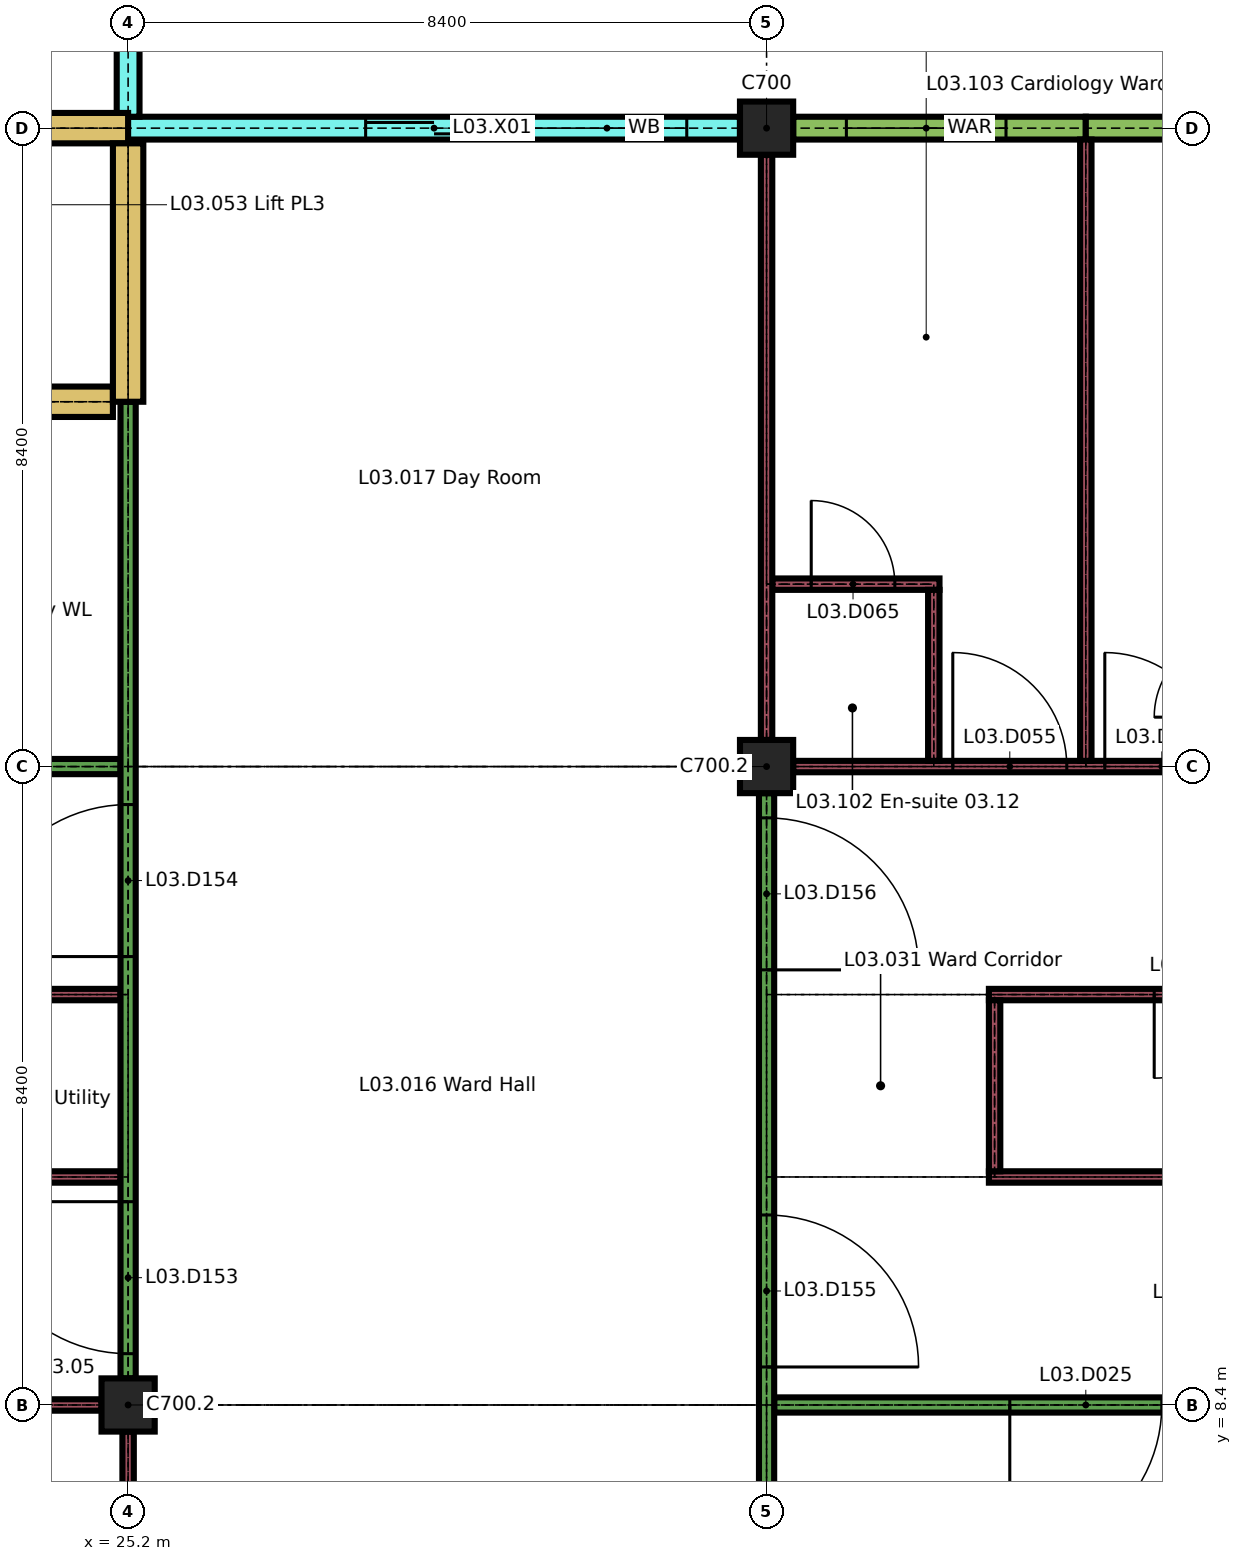
"""IFC4 building model, lengths in metres.
Left out: names, types, materials, properties, quantities, classifications, styles, units other than length and angle.
Written with IfcOpenShell. Run it as: python <this file> out.ifc"""

import sys

from ifc_helpers import new_model, si_unit, direction, frame, frame_2d, origin, origin_2d, place, context, subcontext, project, spatial, rectangle, extrude, element, fill, save


model = new_model("IFC4")
c1 = context("Model", 3, precision=1e-05, world=origin(), true_north=direction((0.0, 1.0)))
c2 = subcontext(c1, "Body", "Model", "MODEL_VIEW")
j1 = project(units=[si_unit("LENGTHUNIT", "METRE"), si_unit("PLANEANGLEUNIT", "RADIAN")], contexts=[c1])
p1 = place(None, origin())
s1 = spatial("IfcSite", under=j1, at=p1, CompositionType="ELEMENT")
p2 = place(p1, origin())
s2 = spatial("IfcBuilding", under=s1, at=p2, CompositionType="ELEMENT")
p3 = place(p2, frame((0.0, 0.0, 15.3)))
s3 = spatial("IfcBuildingStorey", under=s2, at=p3, CompositionType="ELEMENT", Elevation=15.3)
for number, where, z_axis, x_axis in (
    (1, (25.2, 8.4, 0.0), (0.0, 0.0, 1.0), (1.0, 0.0, 0.0)),
    (2, (33.6, 16.8, 0.0), (0.0, 0.0, 1.0), (1.0, 0.0, 0.0)),
    (3, (33.6, 25.2, 0.0), (0.0, 0.0, 1.0), (1.0, 0.0, 0.0)),
):
    element("IfcColumn", number, at=place(p3, frame(where, z_axis=z_axis, x_axis=x_axis)), inside=s3, PredefinedType="COLUMN", context=c2, shape_type="SweptSolid", body=[
        extrude(rectangle(XDim=0.7, YDim=0.7, at=origin_2d()), origin(), (0.0, 0.0, 1.0), 3.26),
    ])
p4 = place(p3, frame((25.05, 25.2, 0.0), z_axis=(0.0, 0.0, 1.0), x_axis=(1.0, 0.0, 0.0)))
e4 = element("IfcWall", 4, at=p4, inside=s3, PredefinedType="SOLIDWALL", context=c2, shape_type="SweptSolid", body=[
    extrude(rectangle(XDim=8.2, YDim=0.3, at=frame_2d((4.1, 0.0))), origin(), (0.0, 0.0, 1.0), 3.26),
])
p5 = place(p4, frame((5.4, 0.0, 0.6)))
e5 = element("IfcOpeningElement", 5, at=p5, cuts=e4, PredefinedType="OPENING", context=c2, shape_type="SweptSolid", body=[
    extrude(rectangle(XDim=2.1, YDim=1.8, at=frame_2d((1.05, 0.9))), frame((0.0, 0.16, 0.0), z_axis=(0.0, -1.0, 0.0), x_axis=(1.0, 0.0, 0.0)), (0.0, 0.0, 1.0), 0.32),
])
p6 = place(p4, frame((3.275, 0.0, 0.0)))
e6 = element("IfcOpeningElement", 6, at=p6, cuts=e4, PredefinedType="OPENING", context=c2, shape_type="SweptSolid", body=[
    extrude(rectangle(XDim=1.8, YDim=2.4, at=frame_2d((0.9, 1.2))), frame((0.0, 0.16, 0.0), z_axis=(0.0, -1.0, 0.0), x_axis=(1.0, 0.0, 0.0)), (0.0, 0.0, 1.0), 0.32),
])
p7 = place(p3, frame((33.95, 25.2, 0.0), z_axis=(0.0, 0.0, 1.0), x_axis=(1.0, 0.0, 0.0)))
e7 = element("IfcWall", 7, at=p7, inside=s3, PredefinedType="SOLIDWALL", context=c2, shape_type="SweptSolid", body=[
    extrude(rectangle(XDim=3.85, YDim=0.3, at=frame_2d((1.925, 0.0))), origin(), (0.0, 0.0, 1.0), 2.96),
])
p8 = place(p7, frame((0.7, 0.0, 0.9)))
e8 = element("IfcOpeningElement", 8, at=p8, cuts=e7, PredefinedType="OPENING", context=c2, shape_type="SweptSolid", body=[
    extrude(rectangle(XDim=2.1, YDim=1.5, at=frame_2d((1.05, 0.75))), frame((0.0, 0.16, 0.0), z_axis=(0.0, -1.0, 0.0), x_axis=(1.0, 0.0, 0.0)), (0.0, 0.0, 1.0), 0.32),
])
p9 = place(p3, frame((37.8, 25.2, 0.0), z_axis=(0.0, 0.0, 1.0), x_axis=(1.0, 0.0, 0.0)))
e9 = element("IfcWall", 9, at=p9, inside=s3, PredefinedType="SOLIDWALL", context=c2, shape_type="SweptSolid", body=[
    extrude(rectangle(XDim=3.825, YDim=0.3, at=frame_2d((1.913, 0.0))), origin(), (0.0, 0.0, 1.0), 2.96),
])
p10 = place(p9, frame((1.05, 0.0, 0.9)))
e10 = element("IfcOpeningElement", 10, at=p10, cuts=e9, PredefinedType="OPENING", context=c2, shape_type="SweptSolid", body=[
    extrude(rectangle(XDim=2.1, YDim=1.5, at=frame_2d((1.05, 0.75))), frame((0.0, 0.16, 0.0), z_axis=(0.0, -1.0, 0.0), x_axis=(1.0, 0.0, 0.0)), (0.0, 0.0, 1.0), 0.32),
])
p11 = place(p3, frame((25.2, 25.35, 0.0), z_axis=(0.0, 0.0, 1.0), x_axis=(0.0, 1.0, 0.0)))
e11 = element("IfcWall", 11, at=p11, inside=s3, PredefinedType="SOLIDWALL", context=c2, shape_type="SweptSolid", body=[
    extrude(rectangle(XDim=7.9, YDim=0.3, at=frame_2d((3.95, 0.0))), origin(), (0.0, 0.0, 1.0), 3.26),
])
p12 = place(p11, frame((5.25, 0.0, 0.6)))
e12 = element("IfcOpeningElement", 12, at=p12, cuts=e11, PredefinedType="OPENING", context=c2, shape_type="SweptSolid", body=[
    extrude(rectangle(XDim=1.8, YDim=1.8, at=frame_2d((0.9, 0.9))), frame((0.0, 0.16, 0.0), z_axis=(0.0, -1.0, 0.0), x_axis=(1.0, 0.0, 0.0)), (0.0, 0.0, 1.0), 0.32),
])
p13 = place(p11, frame((3.075, 0.0, 0.0)))
e13 = element("IfcOpeningElement", 13, at=p13, cuts=e11, PredefinedType="OPENING", context=c2, shape_type="SweptSolid", body=[
    extrude(rectangle(XDim=1.8, YDim=2.4, at=frame_2d((0.9, 1.2))), frame((0.0, 0.16, 0.0), z_axis=(0.0, -1.0, 0.0), x_axis=(1.0, 0.0, 0.0)), (0.0, 0.0, 1.0), 0.32),
])
p14 = place(p3, frame((20.925, 8.4, 0.0), z_axis=(0.0, 0.0, 1.0), x_axis=(1.0, 0.0, 0.0)))
e14 = element("IfcWall", 14, at=p14, inside=s3, PredefinedType="PARTITIONING", context=c2, shape_type="SweptSolid", body=[
    extrude(rectangle(XDim=3.925, YDim=0.15, at=frame_2d((1.962, 0.0))), origin(), (0.0, 0.0, 1.0), 3.26),
])
p15 = place(p14, frame((0.325, 0.0, 0.0)))
e15 = element("IfcOpeningElement", 15, at=p15, cuts=e14, PredefinedType="OPENING", context=c2, shape_type="SweptSolid", body=[
    extrude(rectangle(XDim=1.5, YDim=2.4, at=frame_2d((0.75, 1.2))), frame((0.0, 0.085, 0.0), z_axis=(0.0, -1.0, 0.0), x_axis=(1.0, 0.0, 0.0)), (0.0, 0.0, 1.0), 0.17),
])
p16 = place(p3, frame((33.7, 8.4, 0.0), z_axis=(0.0, 0.0, 1.0), x_axis=(1.0, 0.0, 0.0)))
e16 = element("IfcWall", 16, at=p16, inside=s3, PredefinedType="PARTITIONING", context=c2, shape_type="SweptSolid", body=[
    extrude(rectangle(XDim=8.2, YDim=0.2, at=frame_2d((4.1, 0.0))), origin(), (0.0, 0.0, 1.0), 3.26),
])
p17 = place(p16, frame((3.1, 0.0, 0.0)))
e17 = element("IfcOpeningElement", 17, at=p17, cuts=e16, PredefinedType="OPENING", context=c2, shape_type="SweptSolid", body=[
    extrude(rectangle(XDim=2.0, YDim=2.4, at=frame_2d((1.0, 1.2))), frame((0.0, 0.11, 0.0), z_axis=(0.0, -1.0, 0.0), x_axis=(1.0, 0.0, 0.0)), (0.0, 0.0, 1.0), 0.22),
])
for number, where, z_axis, x_axis in (
    (18, (19.725, 11.4, 0.0), (0.0, 0.0, 1.0), (1.0, 0.0, 0.0)),
    (19, (36.525, 11.4, 0.0), (0.0, 0.0, 1.0), (1.0, 0.0, 0.0)),
):
    element("IfcWall", number, at=place(p3, frame(where, z_axis=z_axis, x_axis=x_axis)), inside=s3, PredefinedType="PARTITIONING", context=c2, shape_type="SweptSolid", body=[
        extrude(rectangle(XDim=5.375, YDim=0.15, at=frame_2d((2.688, 0.0))), origin(), (0.0, 0.0, 1.0), 3.26),
    ])
p18 = place(p3, frame((11.325, 13.8, 0.0), z_axis=(0.0, 0.0, 1.0), x_axis=(1.0, 0.0, 0.0)))
e20 = element("IfcWall", 20, at=p18, inside=s3, PredefinedType="PARTITIONING", context=c2, shape_type="SweptSolid", body=[
    extrude(rectangle(XDim=13.775, YDim=0.15, at=frame_2d((6.888, 0.0))), origin(), (0.0, 0.0, 1.0), 3.26),
])
p19 = place(p18, frame((10.525, 0.0, 0.0)))
e21 = element("IfcOpeningElement", 21, at=p19, cuts=e20, PredefinedType="OPENING", context=c2, shape_type="SweptSolid", body=[
    extrude(rectangle(XDim=1.2, YDim=2.1, at=frame_2d((0.6, 1.05))), frame((0.0, 0.085, 0.0), z_axis=(0.0, -1.0, 0.0), x_axis=(1.0, 0.0, 0.0)), (0.0, 0.0, 1.0), 0.17),
])
p20 = place(p3, frame((36.525, 13.8, 0.0), z_axis=(0.0, 0.0, 1.0), x_axis=(1.0, 0.0, 0.0)))
e22 = element("IfcWall", 22, at=p20, inside=s3, PredefinedType="PARTITIONING", context=c2, shape_type="SweptSolid", body=[
    extrude(rectangle(XDim=5.375, YDim=0.15, at=frame_2d((2.688, 0.0))), origin(), (0.0, 0.0, 1.0), 3.26),
])
p21 = place(p20, frame((2.175, 0.0, 0.0)))
e23 = element("IfcOpeningElement", 23, at=p21, cuts=e22, PredefinedType="OPENING", context=c2, shape_type="SweptSolid", body=[
    extrude(rectangle(XDim=1.1, YDim=2.1, at=frame_2d((0.55, 1.05))), frame((0.0, 0.085, 0.0), z_axis=(0.0, -1.0, 0.0), x_axis=(1.0, 0.0, 0.0)), (0.0, 0.0, 1.0), 0.17),
])
p22 = place(p3, frame((16.7, 16.8, 0.0), z_axis=(0.0, 0.0, 1.0), x_axis=(1.0, 0.0, 0.0)))
e24 = element("IfcWall", 24, at=p22, inside=s3, PredefinedType="PARTITIONING", context=c2, shape_type="SweptSolid", body=[
    extrude(rectangle(XDim=8.4, YDim=0.2, at=frame_2d((4.2, 0.0))), origin(), (0.0, 0.0, 1.0), 3.26),
])
p23 = place(p22, frame((3.25, 0.0, 0.0)))
e25 = element("IfcOpeningElement", 25, at=p23, cuts=e24, PredefinedType="OPENING", context=c2, shape_type="SweptSolid", body=[
    extrude(rectangle(XDim=2.0, YDim=2.4, at=frame_2d((1.0, 1.2))), frame((0.0, 0.11, 0.0), z_axis=(0.0, -1.0, 0.0), x_axis=(1.0, 0.0, 0.0)), (0.0, 0.0, 1.0), 0.22),
])
p24 = place(p3, frame((33.95, 16.8, 0.0), z_axis=(0.0, 0.0, 1.0), x_axis=(1.0, 0.0, 0.0)))
e26 = element("IfcWall", 26, at=p24, inside=s3, PredefinedType="PARTITIONING", context=c2, shape_type="SweptSolid", body=[
    extrude(rectangle(XDim=7.675, YDim=0.15, at=frame_2d((3.837, 0.0))), origin(), (0.0, 0.0, 1.0), 3.26),
])
p25 = place(p24, frame((2.1, 0.0, 0.0)))
e27 = element("IfcOpeningElement", 27, at=p25, cuts=e26, PredefinedType="OPENING", context=c2, shape_type="SweptSolid", body=[
    extrude(rectangle(XDim=1.5, YDim=2.4, at=frame_2d((0.75, 1.2))), frame((0.0, 0.085, 0.0), z_axis=(0.0, -1.0, 0.0), x_axis=(1.0, 0.0, 0.0)), (0.0, 0.0, 1.0), 0.17),
])
p26 = place(p24, frame((4.1, 0.0, 0.0)))
e28 = element("IfcOpeningElement", 28, at=p26, cuts=e26, PredefinedType="OPENING", context=c2, shape_type="SweptSolid", body=[
    extrude(rectangle(XDim=1.5, YDim=2.4, at=frame_2d((0.75, 1.2))), frame((0.0, 0.085, 0.0), z_axis=(0.0, -1.0, 0.0), x_axis=(1.0, 0.0, 0.0)), (0.0, 0.0, 1.0), 0.17),
])
p27 = place(p3, frame((33.675, 19.2, 0.0), z_axis=(0.0, 0.0, 1.0), x_axis=(1.0, 0.0, 0.0)))
e29 = element("IfcWall", 29, at=p27, inside=s3, PredefinedType="PARTITIONING", context=c2, shape_type="SweptSolid", body=[
    extrude(rectangle(XDim=2.2, YDim=0.15, at=frame_2d((1.1, 0.0))), origin(), (0.0, 0.0, 1.0), 3.26),
])
p28 = place(p27, frame((0.512, 0.0, 0.0)))
e30 = element("IfcOpeningElement", 30, at=p28, cuts=e29, PredefinedType="OPENING", context=c2, shape_type="SweptSolid", body=[
    extrude(rectangle(XDim=1.1, YDim=2.1, at=frame_2d((0.55, 1.05))), frame((0.0, 0.085, 0.0), z_axis=(0.0, -1.0, 0.0), x_axis=(1.0, 0.0, 0.0)), (0.0, 0.0, 1.0), 0.17),
])
p29 = place(p3, frame((17.0, 21.6, 0.0), z_axis=(0.0, 0.0, 1.0), x_axis=(1.0, 0.0, 0.0)))
e31 = element("IfcWall", 31, at=p29, inside=s3, PredefinedType="SHEAR", context=c2, shape_type="SweptSolid", body=[
    extrude(rectangle(XDim=8.0, YDim=0.4, at=frame_2d((4.0, 0.0))), origin(), (0.0, 0.0, 1.0), 3.26),
])
p30 = place(p29, frame((1.35, 0.0, 0.0)))
e32 = element("IfcOpeningElement", 32, at=p30, cuts=e31, PredefinedType="OPENING", context=c2, shape_type="SweptSolid", body=[
    extrude(rectangle(XDim=1.3, YDim=2.1, at=frame_2d((0.65, 1.05))), frame((0.0, 0.21, 0.0), z_axis=(0.0, -1.0, 0.0), x_axis=(1.0, 0.0, 0.0)), (0.0, 0.0, 1.0), 0.42),
])
p31 = place(p29, frame((5.45, 0.0, 0.0)))
e33 = element("IfcOpeningElement", 33, at=p31, cuts=e31, PredefinedType="OPENING", context=c2, shape_type="SweptSolid", body=[
    extrude(rectangle(XDim=1.1, YDim=2.1, at=frame_2d((0.55, 1.05))), frame((0.0, 0.21, 0.0), z_axis=(0.0, -1.0, 0.0), x_axis=(1.0, 0.0, 0.0)), (0.0, 0.0, 1.0), 0.42),
])
p32 = place(p3, frame((16.8, 25.2, 0.0), z_axis=(0.0, 0.0, 1.0), x_axis=(1.0, 0.0, 0.0)))
e34 = element("IfcWall", 34, at=p32, inside=s3, PredefinedType="SHEAR", context=c2, shape_type="SweptSolid", body=[
    extrude(rectangle(XDim=8.4, YDim=0.4, at=frame_2d((4.2, 0.0))), origin(), (0.0, 0.0, 1.0), 3.26),
])
p33 = place(p3, frame((25.2, 0.35, 0.0), z_axis=(0.0, 0.0, 1.0), x_axis=(0.0, 1.0, 0.0)))
e35 = element("IfcWall", 35, at=p33, inside=s3, PredefinedType="PARTITIONING", context=c2, shape_type="SweptSolid", body=[
    extrude(rectangle(XDim=7.7, YDim=0.15, at=frame_2d((3.85, 0.0))), origin(), (0.0, 0.0, 1.0), 3.26),
])
p34 = place(p3, frame((25.2, 8.75, 0.0), z_axis=(0.0, 0.0, 1.0), x_axis=(0.0, 1.0, 0.0)))
e36 = element("IfcWall", 36, at=p34, inside=s3, PredefinedType="PARTITIONING", context=c2, shape_type="SweptSolid", body=[
    extrude(rectangle(XDim=12.85, YDim=0.2, at=frame_2d((6.425, 0.0))), origin(), (0.0, 0.0, 1.0), 3.26),
])
p35 = place(p34, frame((0.325, 0.0, 0.0)))
e37 = element("IfcOpeningElement", 37, at=p35, cuts=e36, PredefinedType="OPENING", context=c2, shape_type="SweptSolid", body=[
    extrude(rectangle(XDim=2.0, YDim=2.4, at=frame_2d((1.0, 1.2))), frame((0.0, 0.11, 0.0), z_axis=(0.0, -1.0, 0.0), x_axis=(1.0, 0.0, 0.0)), (0.0, 0.0, 1.0), 0.22),
])
p36 = place(p34, frame((5.55, 0.0, 0.0)))
e38 = element("IfcOpeningElement", 38, at=p36, cuts=e36, PredefinedType="OPENING", context=c2, shape_type="SweptSolid", body=[
    extrude(rectangle(XDim=2.0, YDim=2.4, at=frame_2d((1.0, 1.2))), frame((0.0, 0.11, 0.0), z_axis=(0.0, -1.0, 0.0), x_axis=(1.0, 0.0, 0.0)), (0.0, 0.0, 1.0), 0.22),
])
p37 = place(p3, frame((25.2, 21.6, 0.0), z_axis=(0.0, 0.0, 1.0), x_axis=(0.0, 1.0, 0.0)))
e39 = element("IfcWall", 39, at=p37, inside=s3, PredefinedType="SHEAR", context=c2, shape_type="SweptSolid", body=[
    extrude(rectangle(XDim=3.4, YDim=0.4, at=frame_2d((1.7, 0.0))), origin(), (0.0, 0.0, 1.0), 3.26),
])
p38 = place(p3, frame((33.6, 3.6, 0.0), z_axis=(0.0, 0.0, 1.0), x_axis=(0.0, 1.0, 0.0)))
e40 = element("IfcWall", 40, at=p38, inside=s3, PredefinedType="PARTITIONING", context=c2, shape_type="SweptSolid", body=[
    extrude(rectangle(XDim=12.85, YDim=0.2, at=frame_2d((6.425, 0.0))), origin(), (0.0, 0.0, 1.0), 3.26),
])
p39 = place(p38, frame((5.3, 0.0, 0.0)))
e41 = element("IfcOpeningElement", 41, at=p39, cuts=e40, PredefinedType="OPENING", context=c2, shape_type="SweptSolid", body=[
    extrude(rectangle(XDim=2.0, YDim=2.4, at=frame_2d((1.0, 1.2))), frame((0.0, 0.11, 0.0), z_axis=(0.0, -1.0, 0.0), x_axis=(1.0, 0.0, 0.0)), (0.0, 0.0, 1.0), 0.22),
])
p40 = place(p38, frame((10.525, 0.0, 0.0)))
e42 = element("IfcOpeningElement", 42, at=p40, cuts=e40, PredefinedType="OPENING", context=c2, shape_type="SweptSolid", body=[
    extrude(rectangle(XDim=2.0, YDim=2.4, at=frame_2d((1.0, 1.2))), frame((0.0, 0.11, 0.0), z_axis=(0.0, -1.0, 0.0), x_axis=(1.0, 0.0, 0.0)), (0.0, 0.0, 1.0), 0.22),
])
p41 = place(p3, frame((33.6, 17.15, 0.0), z_axis=(0.0, 0.0, 1.0), x_axis=(0.0, 1.0, 0.0)))
e43 = element("IfcWall", 43, at=p41, inside=s3, PredefinedType="PARTITIONING", context=c2, shape_type="SweptSolid", body=[
    extrude(rectangle(XDim=7.7, YDim=0.15, at=frame_2d((3.85, 0.0))), origin(), (0.0, 0.0, 1.0), 3.26),
])
for number, where, z_axis, x_axis in (
    (44, (35.8, 16.875, 0.0), (0.0, 0.0, 1.0), (0.0, 1.0, 0.0)),
    (45, (36.6, 11.475, 0.0), (0.0, 0.0, 1.0), (0.0, 1.0, 0.0)),
):
    element("IfcWall", number, at=place(p3, frame(where, z_axis=z_axis, x_axis=x_axis)), inside=s3, PredefinedType="PARTITIONING", context=c2, shape_type="SweptSolid", body=[
        extrude(rectangle(XDim=2.25, YDim=0.15, at=frame_2d((1.125, 0.0))), origin(), (0.0, 0.0, 1.0), 3.26),
    ])
p42 = place(p3, frame((37.8, 16.875, 0.0), z_axis=(0.0, 0.0, 1.0), x_axis=(0.0, 1.0, 0.0)))
e46 = element("IfcWall", 46, at=p42, inside=s3, PredefinedType="PARTITIONING", context=c2, shape_type="SweptSolid", body=[
    extrude(rectangle(XDim=8.175, YDim=0.15, at=frame_2d((4.087, 0.0))), origin(), (0.0, 0.0, 1.0), 3.26),
])
p43 = place(p5, origin())
e47 = element("IfcWindow", 47, at=p43, inside=s3, PartitioningType="DOUBLE_PANEL_VERTICAL", PredefinedType="WINDOW", context=c2, shape_type="SweptSolid", body=[
    extrude(rectangle(XDim=2.1, YDim=1.8, at=frame_2d((1.05, 0.9))), frame((0.0, 0.03, 0.0), z_axis=(0.0, -1.0, 0.0), x_axis=(1.0, 0.0, 0.0)), (0.0, 0.0, 1.0), 0.06),
])
fill(e5, e47)
p44 = place(p6, origin())
e48 = element("IfcDoor", 48, at=p44, inside=s3, OperationType="DOUBLE_DOOR_SLIDING", PredefinedType="DOOR", context=c2, shape_type="SweptSolid", body=[
    extrude(rectangle(XDim=1.8, YDim=2.4, at=frame_2d((0.9, 1.2))), frame((0.0, 0.03, 0.0), z_axis=(0.0, -1.0, 0.0), x_axis=(1.0, 0.0, 0.0)), (0.0, 0.0, 1.0), 0.06),
])
fill(e6, e48)
p45 = place(p8, origin())
e49 = element("IfcWindow", 49, at=p45, inside=s3, PartitioningType="DOUBLE_PANEL_VERTICAL", PredefinedType="WINDOW", context=c2, shape_type="SweptSolid", body=[
    extrude(rectangle(XDim=2.1, YDim=1.5, at=frame_2d((1.05, 0.75))), frame((0.0, 0.05, 0.0), z_axis=(0.0, -1.0, 0.0), x_axis=(1.0, 0.0, 0.0)), (0.0, 0.0, 1.0), 0.1),
])
fill(e8, e49)
p46 = place(p17, origin())
e50 = element("IfcDoor", 50, at=p46, inside=s3, OperationType="SINGLE_SWING_LEFT", PredefinedType="DOOR", context=c2, shape_type="SweptSolid", body=[
    extrude(rectangle(XDim=2.0, YDim=2.4, at=frame_2d((1.0, 1.2))), frame((0.0, 0.03, 0.0), z_axis=(0.0, -1.0, 0.0), x_axis=(1.0, 0.0, 0.0)), (0.0, 0.0, 1.0), 0.06),
])
fill(e17, e50)
p47 = place(p21, origin())
e51 = element("IfcDoor", 51, at=p47, inside=s3, OperationType="SINGLE_SWING_LEFT", PredefinedType="DOOR", context=c2, shape_type="SweptSolid", body=[
    extrude(rectangle(XDim=1.1, YDim=2.1, at=frame_2d((0.55, 1.05))), frame((0.0, 0.025, 0.0), z_axis=(0.0, -1.0, 0.0), x_axis=(1.0, 0.0, 0.0)), (0.0, 0.0, 1.0), 0.05),
])
fill(e23, e51)
p48 = place(p25, origin())
e52 = element("IfcDoor", 52, at=p48, inside=s3, OperationType="SINGLE_SWING_RIGHT", PredefinedType="DOOR", context=c2, shape_type="SweptSolid", body=[
    extrude(rectangle(XDim=1.5, YDim=2.4, at=frame_2d((0.75, 1.2))), frame((0.0, 0.03, 0.0), z_axis=(0.0, -1.0, 0.0), x_axis=(1.0, 0.0, 0.0)), (0.0, 0.0, 1.0), 0.06),
])
fill(e27, e52)
p49 = place(p26, origin())
e53 = element("IfcDoor", 53, at=p49, inside=s3, OperationType="SINGLE_SWING_RIGHT", PredefinedType="DOOR", context=c2, shape_type="SweptSolid", body=[
    extrude(rectangle(XDim=1.5, YDim=2.4, at=frame_2d((0.75, 1.2))), frame((0.0, 0.03, 0.0), z_axis=(0.0, -1.0, 0.0), x_axis=(1.0, 0.0, 0.0)), (0.0, 0.0, 1.0), 0.06),
])
fill(e28, e53)
p50 = place(p28, origin())
e54 = element("IfcDoor", 54, at=p50, inside=s3, OperationType="SINGLE_SWING_RIGHT", PredefinedType="DOOR", context=c2, shape_type="SweptSolid", body=[
    extrude(rectangle(XDim=1.1, YDim=2.1, at=frame_2d((0.55, 1.05))), frame((0.0, 0.025, 0.0), z_axis=(0.0, -1.0, 0.0), x_axis=(1.0, 0.0, 0.0)), (0.0, 0.0, 1.0), 0.05),
])
fill(e30, e54)
p51 = place(p35, origin())
e55 = element("IfcDoor", 55, at=p51, inside=s3, OperationType="SINGLE_SWING_LEFT", PredefinedType="DOOR", context=c2, shape_type="SweptSolid", body=[
    extrude(rectangle(XDim=2.0, YDim=2.4, at=frame_2d((1.0, 1.2))), frame((0.0, 0.03, 0.0), z_axis=(0.0, -1.0, 0.0), x_axis=(1.0, 0.0, 0.0)), (0.0, 0.0, 1.0), 0.06),
])
fill(e37, e55)
p52 = place(p36, origin())
e56 = element("IfcDoor", 56, at=p52, inside=s3, OperationType="SINGLE_SWING_RIGHT", PredefinedType="DOOR", context=c2, shape_type="SweptSolid", body=[
    extrude(rectangle(XDim=2.0, YDim=2.4, at=frame_2d((1.0, 1.2))), frame((0.0, 0.03, 0.0), z_axis=(0.0, -1.0, 0.0), x_axis=(1.0, 0.0, 0.0)), (0.0, 0.0, 1.0), 0.06),
])
fill(e38, e56)
p53 = place(p39, origin())
e57 = element("IfcDoor", 57, at=p53, inside=s3, OperationType="SINGLE_SWING_LEFT", PredefinedType="DOOR", context=c2, shape_type="SweptSolid", body=[
    extrude(rectangle(XDim=2.0, YDim=2.4, at=frame_2d((1.0, 1.2))), frame((0.0, 0.03, 0.0), z_axis=(0.0, -1.0, 0.0), x_axis=(1.0, 0.0, 0.0)), (0.0, 0.0, 1.0), 0.06),
])
fill(e41, e57)
p54 = place(p40, origin())
e58 = element("IfcDoor", 58, at=p54, inside=s3, OperationType="SINGLE_SWING_LEFT", PredefinedType="DOOR", context=c2, shape_type="SweptSolid", body=[
    extrude(rectangle(XDim=2.0, YDim=2.4, at=frame_2d((1.0, 1.2))), frame((0.0, 0.03, 0.0), z_axis=(0.0, -1.0, 0.0), x_axis=(1.0, 0.0, 0.0)), (0.0, 0.0, 1.0), 0.06),
])
fill(e42, e58)
save(model, sys.argv[1])
